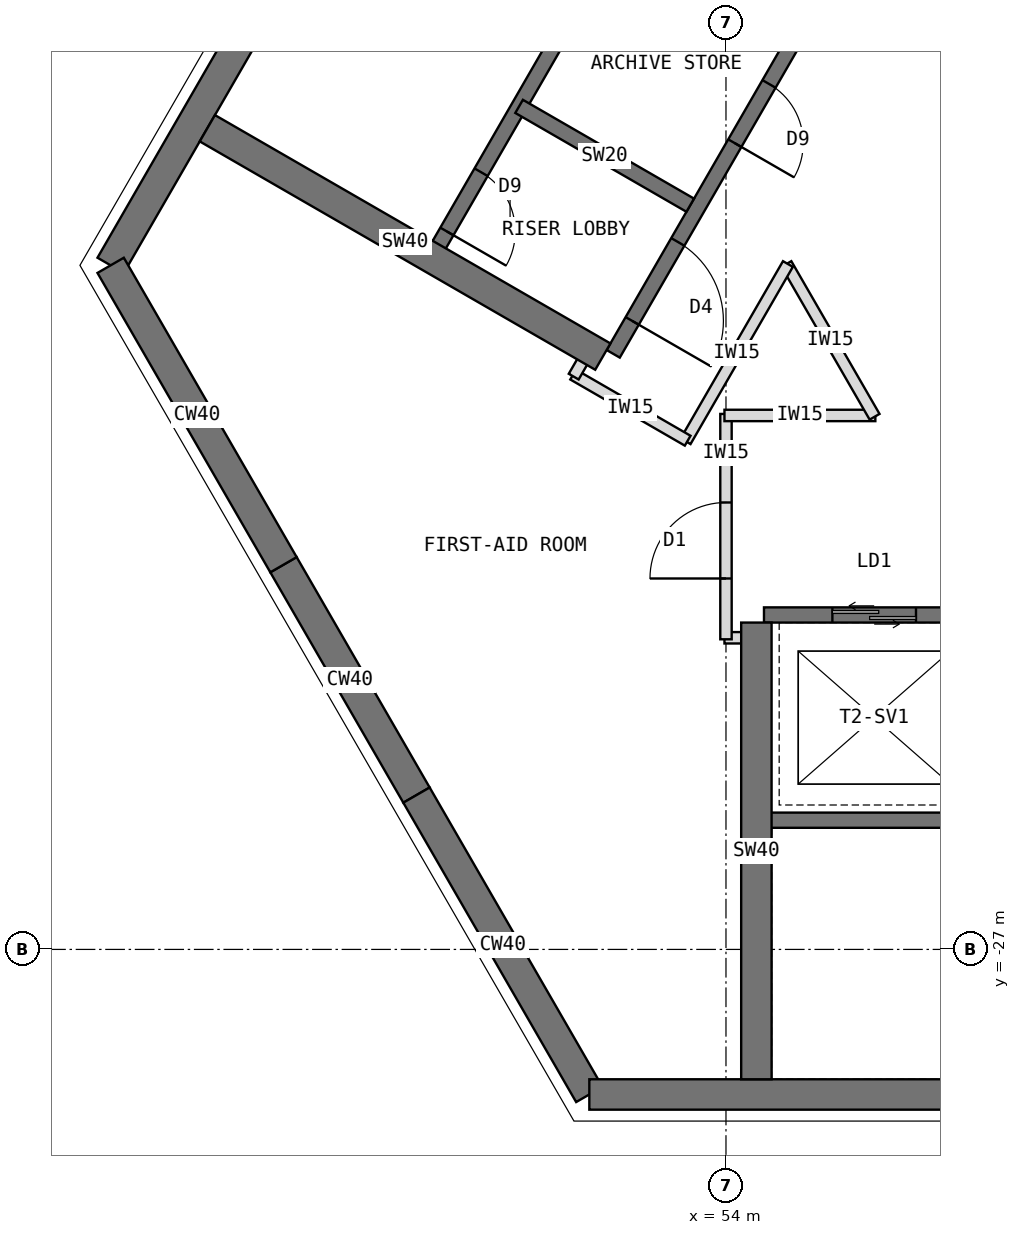
"""IFC4 building model, lengths in metres.
Left out: names, types, materials, properties, quantities, classifications, styles, units other than length and angle.
Written with IfcOpenShell. Run it as: python <this file> out.ifc"""

import sys

from ifc_helpers import new_model, si_unit, direction, frame, frame_2d, origin, place, context, subcontext, project, spatial, rectangle, extrude, element, fill, save


model = new_model("IFC4")
c1 = context("Model", 3, precision=1e-05, world=origin(), true_north=direction((0.0, 1.0)))
c2 = subcontext(c1, "Body", "Model", "MODEL_VIEW")
j1 = project(units=[si_unit("LENGTHUNIT", "METRE"), si_unit("PLANEANGLEUNIT", "RADIAN")], contexts=[c1])
p1 = place(None, origin())
s1 = spatial("IfcSite", under=j1, at=p1, CompositionType="ELEMENT")
p2 = place(p1, origin())
s2 = spatial("IfcBuilding", under=s1, at=p2, CompositionType="ELEMENT")
p3 = place(p2, frame((0.0, 0.0, 287.5)))
s3 = spatial("IfcBuildingStorey", under=s2, at=p3, CompositionType="ELEMENT", Elevation=287.5)
p4 = place(p3, frame((52.202, -7.092, 0.0), z_axis=(0.0, 0.0, 1.0), x_axis=(-0.500005998175, -0.866021940709, 0.0)))
e1 = element("IfcWall", 1, at=p4, inside=s3, PredefinedType="SHEAR", context=c2, shape_type="SweptSolid", body=[
    extrude(rectangle(XDim=12.596, YDim=0.4, at=frame_2d((6.298, 0.0))), origin(), (0.0, 0.0, 1.0), 4.0),
])
p5 = place(p3, frame((45.904, -18.0, 0.0), z_axis=(0.0, 0.0, 1.0), x_axis=(0.500024481964, -0.866011268655, 0.0)))
e2 = element("IfcWall", 2, at=p5, inside=s3, PredefinedType="SHEAR", context=c2, shape_type="SweptSolid", body=[
    extrude(rectangle(XDim=4.548, YDim=0.4, at=frame_2d((2.274, 0.0))), origin(), (0.0, 0.0, 1.0), 4.0),
])
p6 = place(p3, frame((48.178, -21.939, 0.0), z_axis=(0.0, 0.0, 1.0), x_axis=(0.500010275428, -0.866019471182, 0.0)))
e3 = element("IfcWall", 3, at=p6, inside=s3, PredefinedType="SHEAR", context=c2, shape_type="SweptSolid", body=[
    extrude(rectangle(XDim=3.5, YDim=0.4, at=frame_2d((1.75, 0.0))), origin(), (0.0, 0.0, 1.0), 4.0),
])
p7 = place(p3, frame((49.928, -24.97, 0.0), z_axis=(0.0, 0.0, 1.0), x_axis=(0.499984222037, -0.866034513004, 0.0)))
e4 = element("IfcWall", 4, at=p7, inside=s3, PredefinedType="SHEAR", context=c2, shape_type="SweptSolid", body=[
    extrude(rectangle(XDim=4.548, YDim=0.4, at=frame_2d((2.274, 0.0))), origin(), (0.0, 0.0, 1.0), 4.0),
])
p8 = place(p3, frame((52.202, -28.908, 0.0), z_axis=(0.0, 0.0, 1.0), x_axis=(1.0, 0.0, 0.0)))
e5 = element("IfcWall", 5, at=p8, inside=s3, PredefinedType="SHEAR", context=c2, shape_type="SweptSolid", body=[
    extrude(rectangle(XDim=12.596, YDim=0.4, at=frame_2d((6.298, 0.0))), origin(), (0.0, 0.0, 1.0), 4.0),
])
p9 = place(p3, frame((56.516, -12.236, 0.0), z_axis=(0.0, 0.0, 1.0), x_axis=(-0.49999894854, -0.866026010844, 0.0)))
e6 = element("IfcWall", 6, at=p9, inside=s3, PredefinedType="SHEAR", context=c2, shape_type="SweptSolid", body=[
    extrude(rectangle(XDim=8.0, YDim=0.2, at=frame_2d((4.0, 0.0))), origin(), (0.0, 0.0, 1.0), 4.0),
])
p10 = place(p9, frame((6.3, 0.0, 0.0)))
e7 = element("IfcOpeningElement", 7, at=p10, cuts=e6, PredefinedType="OPENING", context=c2, shape_type="SweptSolid", body=[
    extrude(rectangle(XDim=1.2, YDim=2.1, at=frame_2d((0.6, 1.05))), frame((0.0, 0.11, 0.0), z_axis=(0.0, -1.0, 0.0), x_axis=(1.0, 0.0, 0.0)), (0.0, 0.0, 1.0), 0.22),
])
p11 = place(p9, frame((1.0, 0.0, 0.0)))
e8 = element("IfcOpeningElement", 8, at=p11, cuts=e6, PredefinedType="OPENING", context=c2, shape_type="SweptSolid", body=[
    extrude(rectangle(XDim=0.9, YDim=2.1, at=frame_2d((0.45, 1.05))), frame((0.0, 0.11, 0.0), z_axis=(0.0, -1.0, 0.0), x_axis=(1.0, 0.0, 0.0)), (0.0, 0.0, 1.0), 0.22),
])
p12 = place(p9, frame((3.9, 0.0, 0.0)))
e9 = element("IfcOpeningElement", 9, at=p12, cuts=e6, PredefinedType="OPENING", context=c2, shape_type="SweptSolid", body=[
    extrude(rectangle(XDim=0.9, YDim=2.1, at=frame_2d((0.45, 1.05))), frame((0.0, 0.11, 0.0), z_axis=(0.0, -1.0, 0.0), x_axis=(1.0, 0.0, 0.0)), (0.0, 0.0, 1.0), 0.22),
])
p13 = place(p3, frame((53.53, -17.209, 0.0), z_axis=(0.0, 0.0, 1.0), x_axis=(-0.866062058628, 0.499936506574, 0.0)))
e10 = element("IfcWall", 10, at=p13, inside=s3, PredefinedType="SHEAR", context=c2, shape_type="SweptSolid", body=[
    extrude(rectangle(XDim=2.6, YDim=0.2, at=frame_2d((1.3, 0.0))), origin(), (0.0, 0.0, 1.0), 4.0),
])
p14 = place(p3, frame((54.178, -10.886, 0.0), z_axis=(0.0, 0.0, 1.0), x_axis=(-0.49999894854, -0.866026010844, 0.0)))
e11 = element("IfcWall", 11, at=p14, inside=s3, PredefinedType="SHEAR", context=c2, shape_type="SweptSolid", body=[
    extrude(rectangle(XDim=8.0, YDim=0.2, at=frame_2d((4.0, 0.0))), origin(), (0.0, 0.0, 1.0), 4.0),
])
p15 = place(p14, frame((6.8, 0.0, 0.0)))
e12 = element("IfcOpeningElement", 12, at=p15, cuts=e11, PredefinedType="OPENING", context=c2, shape_type="SweptSolid", body=[
    extrude(rectangle(XDim=0.9, YDim=2.1, at=frame_2d((0.45, 1.05))), frame((0.0, 0.11, 0.0), z_axis=(0.0, -1.0, 0.0), x_axis=(1.0, 0.0, 0.0)), (0.0, 0.0, 1.0), 0.22),
])
p16 = place(p3, frame((52.38, -19.201, 0.0), z_axis=(0.0, 0.0, 1.0), x_axis=(-0.866026570101, 0.499997979876, 0.0)))
e13 = element("IfcWall", 13, at=p16, inside=s3, PredefinedType="SHEAR", context=c2, shape_type="SweptSolid", body=[
    extrude(rectangle(XDim=6.008, YDim=0.4, at=frame_2d((3.004, 0.0))), origin(), (0.0, 0.0, 1.0), 4.0),
])
p17 = place(p3, frame((54.5, -22.6, 0.0), z_axis=(0.0, 0.0, 1.0), x_axis=(1.0, 0.0, 0.0)))
e14 = element("IfcWall", 14, at=p17, inside=s3, PredefinedType="SHEAR", context=c2, shape_type="SweptSolid", body=[
    extrude(rectangle(XDim=8.0, YDim=0.2, at=frame_2d((4.0, 0.0))), origin(), (0.0, 0.0, 1.0), 4.0),
])
p18 = place(p17, frame((6.3, 0.0, 0.0)))
e15 = element("IfcOpeningElement", 15, at=p18, cuts=e14, PredefinedType="OPENING", context=c2, shape_type="SweptSolid", body=[
    extrude(rectangle(XDim=1.2, YDim=2.1, at=frame_2d((0.6, 1.05))), frame((0.0, 0.11, 0.0), z_axis=(0.0, -1.0, 0.0), x_axis=(1.0, 0.0, 0.0)), (0.0, 0.0, 1.0), 0.22),
])
p19 = place(p17, frame((0.9, 0.0, 0.0)))
e16 = element("IfcOpeningElement", 16, at=p19, cuts=e14, PredefinedType="OPENING", context=c2, shape_type="SweptSolid", body=[
    extrude(rectangle(XDim=1.1, YDim=2.2, at=frame_2d((0.55, 1.1))), frame((0.0, 0.11, 0.0), z_axis=(0.0, -1.0, 0.0), x_axis=(1.0, 0.0, 0.0)), (0.0, 0.0, 1.0), 0.22),
])
p20 = place(p3, frame((54.5, -25.3, 0.0), z_axis=(0.0, 0.0, 1.0), x_axis=(1.0, 0.0, 0.0)))
e17 = element("IfcWall", 17, at=p20, inside=s3, PredefinedType="SHEAR", context=c2, shape_type="SweptSolid", body=[
    extrude(rectangle(XDim=8.0, YDim=0.2, at=frame_2d((4.0, 0.0))), origin(), (0.0, 0.0, 1.0), 4.0),
])
p21 = place(p20, frame((6.7, 0.0, 0.0)))
e18 = element("IfcOpeningElement", 18, at=p21, cuts=e17, PredefinedType="OPENING", context=c2, shape_type="SweptSolid", body=[
    extrude(rectangle(XDim=1.1, YDim=2.1, at=frame_2d((0.55, 1.05))), frame((0.0, 0.11, 0.0), z_axis=(0.0, -1.0, 0.0), x_axis=(1.0, 0.0, 0.0)), (0.0, 0.0, 1.0), 0.22),
])
p22 = place(p3, frame((54.4, -22.7, 0.0), z_axis=(0.0, 0.0, 1.0), x_axis=(0.0, -1.0, 0.0)))
e19 = element("IfcWall", 19, at=p22, inside=s3, PredefinedType="SHEAR", context=c2, shape_type="SweptSolid", body=[
    extrude(rectangle(XDim=6.008, YDim=0.4, at=frame_2d((3.004, 0.0))), origin(), (0.0, 0.0, 1.0), 4.0),
])
p23 = place(p3, frame((54.41, -22.9, 0.0), z_axis=(0.0, 0.0, 1.0), x_axis=(-1.0, 0.0, 0.0)))
e20 = element("IfcWall", 20, at=p23, inside=s3, PredefinedType="PARTITIONING", context=c2, shape_type="SweptSolid", body=[
    extrude(rectangle(XDim=0.43, YDim=0.15, at=frame_2d((0.215, 0.0))), origin(), (0.0, 0.0, 1.0), 3.7),
])
p24 = place(p3, frame((54.0, -22.92, 0.0), z_axis=(0.0, 0.0, 1.0), x_axis=(0.0, 1.0, 0.0)))
e21 = element("IfcWall", 21, at=p24, inside=s3, PredefinedType="PARTITIONING", context=c2, shape_type="SweptSolid", body=[
    extrude(rectangle(XDim=2.965, YDim=0.15, at=frame_2d((1.482, 0.0))), origin(), (0.0, 0.0, 1.0), 3.7),
])
p25 = place(p24, frame((0.8, 0.0, 0.0)))
e22 = element("IfcOpeningElement", 22, at=p25, cuts=e21, PredefinedType="OPENING", context=c2, shape_type="SweptSolid", body=[
    extrude(rectangle(XDim=1.0, YDim=2.1, at=frame_2d((0.5, 1.05))), frame((0.0, 0.085, 0.0), z_axis=(0.0, -1.0, 0.0), x_axis=(1.0, 0.0, 0.0)), (0.0, 0.0, 1.0), 0.17),
])
p26 = place(p3, frame((53.98, -19.975, 0.0), z_axis=(0.0, 0.0, 1.0), x_axis=(1.0, 0.0, 0.0)))
e23 = element("IfcWall", 23, at=p26, inside=s3, PredefinedType="PARTITIONING", context=c2, shape_type="SweptSolid", body=[
    extrude(rectangle(XDim=1.985, YDim=0.15, at=frame_2d((0.993, 0.0))), origin(), (0.0, 0.0, 1.0), 3.7),
])
p27 = place(p3, frame((55.955, -19.992, 0.0), z_axis=(0.0, 0.0, 1.0), x_axis=(-0.499941024108, 0.866059450854, 0.0)))
e24 = element("IfcWall", 24, at=p27, inside=s3, PredefinedType="PARTITIONING", context=c2, shape_type="SweptSolid", body=[
    extrude(rectangle(XDim=2.321, YDim=0.15, at=frame_2d((1.16, 0.0))), origin(), (0.0, 0.0, 1.0), 3.7),
])
p28 = place(p3, frame((54.815, -17.983, 0.0), z_axis=(0.0, 0.0, 1.0), x_axis=(-0.499981473571, -0.866036099759, 0.0)))
e25 = element("IfcWall", 25, at=p28, inside=s3, PredefinedType="PARTITIONING", context=c2, shape_type="SweptSolid", body=[
    extrude(rectangle(XDim=2.692, YDim=0.15, at=frame_2d((1.346, 0.0))), origin(), (0.0, 0.0, 1.0), 3.7),
])
p29 = place(p3, frame((53.496, -20.307, 0.0), z_axis=(0.0, 0.0, 1.0), x_axis=(-0.865989304205, 0.500062521093, 0.0)))
e26 = element("IfcWall", 26, at=p29, inside=s3, PredefinedType="PARTITIONING", context=c2, shape_type="SweptSolid", body=[
    extrude(rectangle(XDim=1.74, YDim=0.15, at=frame_2d((0.87, 0.0))), origin(), (0.0, 0.0, 1.0), 3.7),
])
p30 = place(p3, frame((51.997, -19.464, 0.0), z_axis=(0.0, 0.0, 1.0), x_axis=(0.499804398801, 0.866138304741, 0.0)))
e27 = element("IfcWall", 27, at=p30, inside=s3, PredefinedType="PARTITIONING", context=c2, shape_type="SweptSolid", body=[
    extrude(rectangle(XDim=0.43, YDim=0.15, at=frame_2d((0.215, 0.0))), origin(), (0.0, 0.0, 1.0), 3.7),
])
p31 = place(p10, origin())
e28 = element("IfcDoor", 28, at=p31, inside=s3, OperationType="SINGLE_SWING_RIGHT", PredefinedType="DOOR", context=c2, shape_type="SweptSolid", body=[
    extrude(rectangle(XDim=1.2, YDim=2.1, at=frame_2d((0.6, 1.05))), frame((0.0, 0.025, 0.0), z_axis=(0.0, -1.0, 0.0), x_axis=(1.0, 0.0, 0.0)), (0.0, 0.0, 1.0), 0.05),
])
fill(e7, e28)
p32 = place(p15, origin())
e29 = element("IfcDoor", 29, at=p32, inside=s3, OperationType="SINGLE_SWING_RIGHT", PredefinedType="DOOR", context=c2, shape_type="SweptSolid", body=[
    extrude(rectangle(XDim=0.9, YDim=2.1, at=frame_2d((0.45, 1.05))), frame((0.0, 0.025, 0.0), z_axis=(0.0, -1.0, 0.0), x_axis=(1.0, 0.0, 0.0)), (0.0, 0.0, 1.0), 0.05),
])
fill(e12, e29)
p33 = place(p19, origin())
e30 = element("IfcDoor", 30, at=p33, inside=s3, OperationType="DOUBLE_DOOR_SLIDING", PredefinedType="DOOR", context=c2, shape_type="SweptSolid", body=[
    extrude(rectangle(XDim=1.1, YDim=2.2, at=frame_2d((0.55, 1.1))), frame((0.0, 0.025, 0.0), z_axis=(0.0, -1.0, 0.0), x_axis=(1.0, 0.0, 0.0)), (0.0, 0.0, 1.0), 0.05),
])
fill(e16, e30)
p34 = place(p25, origin())
e31 = element("IfcDoor", 31, at=p34, inside=s3, OperationType="SINGLE_SWING_LEFT", PredefinedType="DOOR", context=c2, shape_type="SweptSolid", body=[
    extrude(rectangle(XDim=1.0, YDim=2.1, at=frame_2d((0.5, 1.05))), frame((0.0, 0.025, 0.0), z_axis=(0.0, -1.0, 0.0), x_axis=(1.0, 0.0, 0.0)), (0.0, 0.0, 1.0), 0.05),
])
fill(e22, e31)
p35 = place(p12, origin())
e32 = element("IfcDoor", 32, at=p35, inside=s3, OperationType="SINGLE_SWING_RIGHT", PredefinedType="DOOR", context=c2, shape_type="SweptSolid", body=[
    extrude(rectangle(XDim=0.9, YDim=2.1, at=frame_2d((0.45, 1.05))), frame((0.0, 0.025, 0.0), z_axis=(0.0, -1.0, 0.0), x_axis=(1.0, 0.0, 0.0)), (0.0, 0.0, 1.0), 0.05),
])
fill(e9, e32)
save(model, sys.argv[1])
